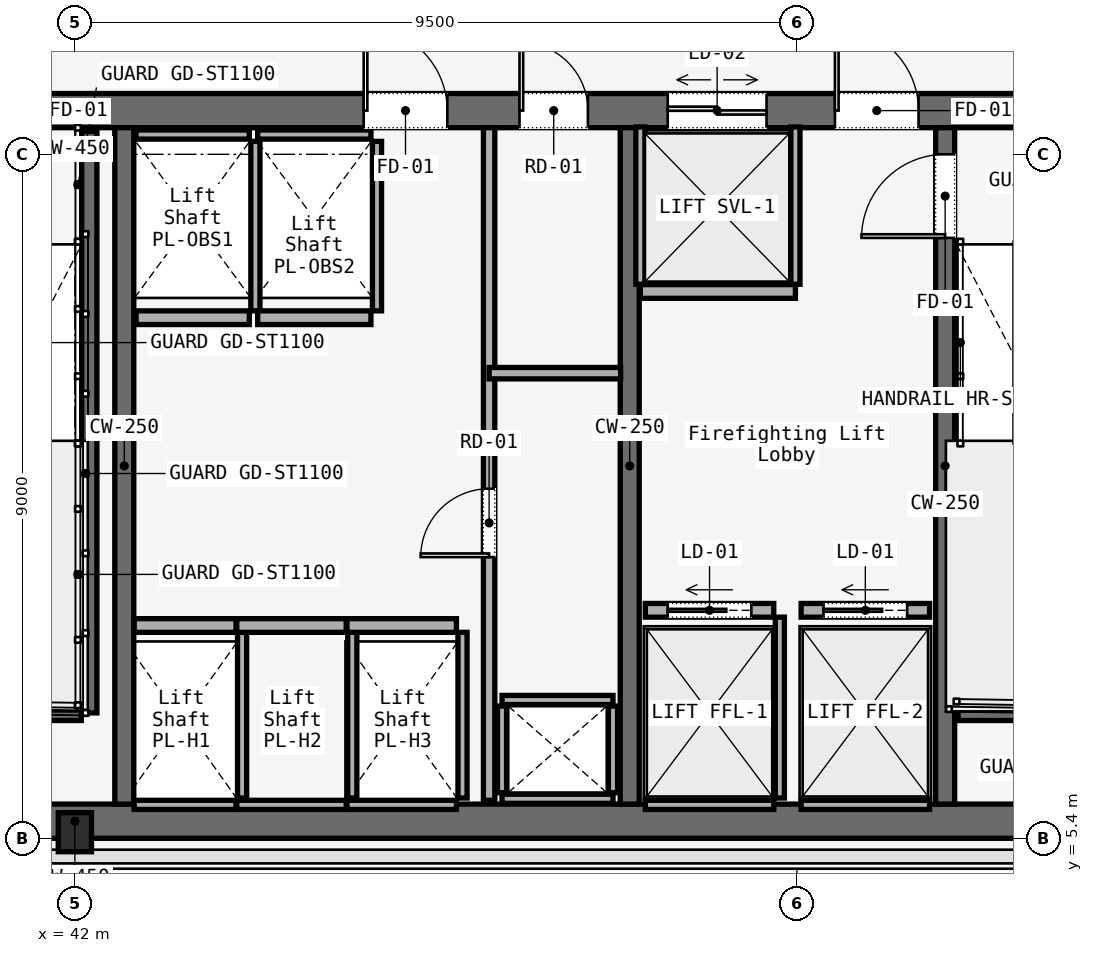
"""IFC4 building model, lengths in metres.
Left out: names, types, materials, properties, quantities, classifications, styles, units other than length and angle.
Written with IfcOpenShell. Run it as: python <this file> out.ifc"""

import sys

from ifc_helpers import new_model, si_unit, direction, frame, frame_2d, origin, origin_2d, place, context, subcontext, project, spatial, rectangle, i_section, extrude, element, fill, save


model = new_model("IFC4")
c1 = context("Model", 3, precision=1e-05, world=origin(), true_north=direction((0.0, 1.0)))
c2 = subcontext(c1, "Body", "Model", "MODEL_VIEW")
j1 = project(units=[si_unit("LENGTHUNIT", "METRE"), si_unit("PLANEANGLEUNIT", "RADIAN")], contexts=[c1])
p1 = place(None, origin())
s1 = spatial("IfcSite", under=j1, at=p1, CompositionType="ELEMENT")
p2 = place(p1, origin())
s2 = spatial("IfcBuilding", under=s1, at=p2, CompositionType="ELEMENT")
p3 = place(p2, frame((0.0, 0.0, 89.2)))
s3 = spatial("IfcBuildingStorey", under=s2, at=p3, CompositionType="ELEMENT", Elevation=89.2)
p4 = place(p3, frame((26.45, 14.975, 0.0), z_axis=(0.0, 0.0, 1.0), x_axis=(1.0, 0.0, 0.0)))
e1 = element("IfcWall", 1, at=p4, inside=s3, PredefinedType="SOLIDWALL", context=c2, shape_type="SweptSolid", body=[
    extrude(rectangle(XDim=31.1, YDim=0.45, at=frame_2d((15.55, 0.0))), origin(), (0.0, 0.0, 1.0), 3.58),
])
p5 = place(p4, frame((1.65, 0.0, 0.0)))
e2 = element("IfcOpeningElement", 2, at=p5, cuts=e1, PredefinedType="OPENING", context=c2, shape_type="SweptSolid", body=[
    extrude(rectangle(XDim=1.1, YDim=2.2, at=frame_2d((0.55, 1.1))), frame((0.0, 0.225, 0.0), z_axis=(0.0, -1.0, 0.0), x_axis=(1.0, 0.0, 0.0)), (0.0, 0.0, 1.0), 0.45),
])
p6 = place(p4, frame((13.65, 0.0, 0.0)))
e3 = element("IfcOpeningElement", 3, at=p6, cuts=e1, PredefinedType="OPENING", context=c2, shape_type="SweptSolid", body=[
    extrude(rectangle(XDim=1.1, YDim=2.2, at=frame_2d((0.55, 1.1))), frame((0.0, 0.225, 0.0), z_axis=(0.0, -1.0, 0.0), x_axis=(1.0, 0.0, 0.0)), (0.0, 0.0, 1.0), 0.45),
])
p7 = place(p4, frame((25.55, 0.0, 0.0)))
e4 = element("IfcOpeningElement", 4, at=p7, cuts=e1, PredefinedType="OPENING", context=c2, shape_type="SweptSolid", body=[
    extrude(rectangle(XDim=1.1, YDim=2.2, at=frame_2d((0.55, 1.1))), frame((0.0, 0.225, 0.0), z_axis=(0.0, -1.0, 0.0), x_axis=(1.0, 0.0, 0.0)), (0.0, 0.0, 1.0), 0.45),
])
p8 = place(p4, frame((10.7, 0.0, 0.0)))
e5 = element("IfcOpeningElement", 5, at=p8, cuts=e1, PredefinedType="OPENING", context=c2, shape_type="SweptSolid", body=[
    extrude(rectangle(XDim=1.4, YDim=2.2, at=frame_2d((0.7, 1.1))), frame((0.0, 0.225, 0.0), z_axis=(0.0, -1.0, 0.0), x_axis=(1.0, 0.0, 0.0)), (0.0, 0.0, 1.0), 0.45),
])
p9 = place(p4, frame((19.35, 0.0, 0.0)))
e6 = element("IfcOpeningElement", 6, at=p9, cuts=e1, PredefinedType="OPENING", context=c2, shape_type="SweptSolid", body=[
    extrude(rectangle(XDim=1.1, YDim=2.2, at=frame_2d((0.55, 1.1))), frame((0.0, 0.225, 0.0), z_axis=(0.0, -1.0, 0.0), x_axis=(1.0, 0.0, 0.0)), (0.0, 0.0, 1.0), 0.45),
])
p10 = place(p4, frame((21.4, 0.0, 0.0)))
e7 = element("IfcOpeningElement", 7, at=p10, cuts=e1, PredefinedType="OPENING", context=c2, shape_type="SweptSolid", body=[
    extrude(rectangle(XDim=0.9, YDim=2.1, at=frame_2d((0.45, 1.05))), frame((0.0, 0.225, 0.0), z_axis=(0.0, -1.0, 0.0), x_axis=(1.0, 0.0, 0.0)), (0.0, 0.0, 1.0), 0.45),
])
p11 = place(p4, frame((23.35, 0.0, 0.0)))
e8 = element("IfcOpeningElement", 8, at=p11, cuts=e1, PredefinedType="OPENING", context=c2, shape_type="SweptSolid", body=[
    extrude(rectangle(XDim=1.3, YDim=2.3, at=frame_2d((0.65, 1.15))), frame((0.0, 0.225, 0.0), z_axis=(0.0, -1.0, 0.0), x_axis=(1.0, 0.0, 0.0)), (0.0, 0.0, 1.0), 0.45),
])
p12 = place(p3, frame((26.45, 5.625, 0.0), z_axis=(0.0, 0.0, 1.0), x_axis=(1.0, 0.0, 0.0)))
e9 = element("IfcWall", 9, at=p12, inside=s3, PredefinedType="SOLIDWALL", context=c2, shape_type="SweptSolid", body=[
    extrude(rectangle(XDim=31.1, YDim=0.45, at=frame_2d((15.55, 0.0))), origin(), (0.0, 0.0, 1.0), 3.58),
])
for number, where, z_axis, x_axis in (
    (10, (42.65, 5.85, 0.0), (0.0, 0.0, 1.0), (0.0, 1.0, 0.0)),
    (11, (49.3, 5.85, 0.0), (0.0, 0.0, 1.0), (0.0, 1.0, 0.0)),
):
    element("IfcWall", number, at=place(p3, frame(where, z_axis=z_axis, x_axis=x_axis)), inside=s3, PredefinedType="SOLIDWALL", context=c2, shape_type="SweptSolid", body=[
        extrude(rectangle(XDim=8.9, YDim=0.25, at=frame_2d((4.45, 0.0))), origin(), (0.0, 0.0, 1.0), 3.58),
    ])
p13 = place(p3, frame((53.45, 5.85, 0.0), z_axis=(0.0, 0.0, 1.0), x_axis=(0.0, 1.0, 0.0)))
e12 = element("IfcWall", 12, at=p13, inside=s3, PredefinedType="SOLIDWALL", context=c2, shape_type="SweptSolid", body=[
    extrude(rectangle(XDim=8.9, YDim=0.25, at=frame_2d((4.45, 0.0))), origin(), (0.0, 0.0, 1.0), 3.58),
])
p14 = place(p13, frame((7.45, 0.0, 0.0)))
e13 = element("IfcOpeningElement", 13, at=p14, cuts=e12, PredefinedType="OPENING", context=c2, shape_type="SweptSolid", body=[
    extrude(rectangle(XDim=1.1, YDim=2.2, at=frame_2d((0.55, 1.1))), frame((0.0, 0.125, 0.0), z_axis=(0.0, -1.0, 0.0), x_axis=(1.0, 0.0, 0.0)), (0.0, 0.0, 1.0), 0.25),
])
p15 = place(p3, frame((42.0, 5.48, 0.0), z_axis=(0.0, 0.0, 1.0), x_axis=(1.0, 0.0, 0.0)))
e14 = element("IfcColumn", 14, at=p15, inside=s3, PredefinedType="COLUMN", context=c2, shape_type="SweptSolid", body=[
    extrude(i_section(OverallWidth=0.437, OverallDepth=0.514, WebThickness=0.061, FlangeThickness=0.077, FilletRadius=0.015, at=origin_2d()), origin(), (0.0, 0.0, 1.0), 3.58),
])
p16 = place(p3, frame((42.19, 14.7, 0.0), z_axis=(0.0, 0.0, 1.0), x_axis=(0.0, -1.0, 0.0)))
e15 = element("IfcWall", 15, at=p16, inside=s3, PredefinedType="SOLIDWALL", context=c2, shape_type="SweptSolid", body=[
    extrude(rectangle(XDim=7.65, YDim=0.2, at=frame_2d((3.825, 0.0))), origin(), (0.0, 0.0, 1.0), 3.8),
])
for number, where, z_axis, x_axis in (
    (16, (38.97, 7.05, 0.0), (0.0, 0.0, 1.0), (1.0, 0.0, 0.0)),
    (17, (53.62, 7.05, 0.0), (0.0, 0.0, 1.0), (1.0, 0.0, 0.0)),
):
    element("IfcWall", number, at=place(p3, frame(where, z_axis=z_axis, x_axis=x_axis)), inside=s3, PredefinedType="SOLIDWALL", context=c2, shape_type="SweptSolid", body=[
        extrude(rectangle(XDim=3.115, YDim=0.2, at=frame_2d((1.558, 0.0))), origin(), (0.0, 0.0, 1.0), 3.8),
    ])
for number, where, z_axis, x_axis in (
    (18, (47.62, 5.92, 0.0), (0.0, 0.0, 1.0), (1.0, 0.0, 0.0)),
    (19, (47.62, 7.22, 0.0), (0.0, 0.0, 1.0), (1.0, 0.0, 0.0)),
):
    element("IfcWall", number, at=place(p3, frame(where, z_axis=z_axis, x_axis=x_axis)), inside=s3, PredefinedType="SOLIDWALL", context=c2, shape_type="SweptSolid", body=[
        extrude(rectangle(XDim=1.46, YDim=0.12, at=frame_2d((0.73, 0.0))), origin(), (0.0, 0.0, 1.0), 2.95),
    ])
for number, where, z_axis, x_axis in (
    (20, (47.62, 6.0, 0.0), (0.0, 0.0, 1.0), (0.0, 1.0, 0.0)),
    (21, (49.08, 6.0, 0.0), (0.0, 0.0, 1.0), (0.0, 1.0, 0.0)),
):
    element("IfcWall", number, at=place(p3, frame(where, z_axis=z_axis, x_axis=x_axis)), inside=s3, PredefinedType="SOLIDWALL", context=c2, shape_type="SweptSolid", body=[
        extrude(rectangle(XDim=1.14, YDim=0.12, at=frame_2d((0.57, 0.0))), origin(), (0.0, 0.0, 1.0), 2.95),
    ])
p17 = place(p3, frame((47.45, 5.9, 0.0), z_axis=(0.0, 0.0, 1.0), x_axis=(0.0, 1.0, 0.0)))
e22 = element("IfcWall", 22, at=p17, inside=s3, PredefinedType="PARTITIONING", context=c2, shape_type="SweptSolid", body=[
    extrude(rectangle(XDim=8.85, YDim=0.15, at=frame_2d((4.425, 0.0))), origin(), (0.0, 0.0, 1.0), 2.95),
])
p18 = place(p17, frame((3.2, 0.0, 0.0)))
e23 = element("IfcOpeningElement", 23, at=p18, cuts=e22, PredefinedType="OPENING", context=c2, shape_type="SweptSolid", body=[
    extrude(rectangle(XDim=0.9, YDim=2.1, at=frame_2d((0.45, 1.05))), frame((0.0, 0.075, 0.0), z_axis=(0.0, -1.0, 0.0), x_axis=(1.0, 0.0, 0.0)), (0.0, 0.0, 1.0), 0.15),
])
p19 = place(p3, frame((47.45, 11.52, 0.0), z_axis=(0.0, 0.0, 1.0), x_axis=(1.0, 0.0, 0.0)))
e24 = element("IfcWall", 24, at=p19, inside=s3, PredefinedType="PARTITIONING", context=c2, shape_type="SweptSolid", body=[
    extrude(rectangle(XDim=1.73, YDim=0.15, at=frame_2d((0.865, 0.0))), origin(), (0.0, 0.0, 1.0), 2.95),
])
p20 = place(p3, frame((42.78, 8.2, 0.0), z_axis=(0.0, 0.0, 1.0), x_axis=(1.0, 0.0, 0.0)))
e25 = element("IfcWall", 25, at=p20, inside=s3, PredefinedType="SOLIDWALL", context=c2, shape_type="SweptSolid", body=[
    extrude(rectangle(XDim=1.34, YDim=0.18, at=frame_2d((0.67, 0.0))), origin(), (0.0, 0.0, 1.0), 2.95),
])
p21 = place(p3, frame((42.78, 5.84, 0.0), z_axis=(0.0, 0.0, 1.0), x_axis=(1.0, 0.0, 0.0)))
e26 = element("IfcWall", 26, at=p21, inside=s3, PredefinedType="SOLIDWALL", context=c2, shape_type="SweptSolid", body=[
    extrude(rectangle(XDim=1.34, YDim=0.12, at=frame_2d((0.67, 0.0))), origin(), (0.0, 0.0, 1.0), 2.95),
])
p22 = place(p3, frame((44.2, 5.93, 0.0), z_axis=(0.0, 0.0, 1.0), x_axis=(0.0, 1.0, 0.0)))
e27 = element("IfcWall", 27, at=p22, inside=s3, PredefinedType="SOLIDWALL", context=c2, shape_type="SweptSolid", body=[
    extrude(rectangle(XDim=2.18, YDim=0.12, at=frame_2d((1.09, 0.0))), origin(), (0.0, 0.0, 1.0), 2.95),
])
p23 = place(p3, frame((44.13, 8.2, 0.0), z_axis=(0.0, 0.0, 1.0), x_axis=(1.0, 0.0, 0.0)))
e28 = element("IfcWall", 28, at=p23, inside=s3, PredefinedType="SOLIDWALL", context=c2, shape_type="SweptSolid", body=[
    extrude(rectangle(XDim=1.44, YDim=0.18, at=frame_2d((0.72, 0.0))), origin(), (0.0, 0.0, 1.0), 2.95),
])
p24 = place(p3, frame((44.13, 5.84, 0.0), z_axis=(0.0, 0.0, 1.0), x_axis=(1.0, 0.0, 0.0)))
e29 = element("IfcWall", 29, at=p24, inside=s3, PredefinedType="SOLIDWALL", context=c2, shape_type="SweptSolid", body=[
    extrude(rectangle(XDim=1.44, YDim=0.12, at=frame_2d((0.72, 0.0))), origin(), (0.0, 0.0, 1.0), 2.95),
])
p25 = place(p3, frame((45.65, 5.93, 0.0), z_axis=(0.0, 0.0, 1.0), x_axis=(0.0, 1.0, 0.0)))
e30 = element("IfcWall", 30, at=p25, inside=s3, PredefinedType="SOLIDWALL", context=c2, shape_type="SweptSolid", body=[
    extrude(rectangle(XDim=2.18, YDim=0.12, at=frame_2d((1.09, 0.0))), origin(), (0.0, 0.0, 1.0), 2.95),
])
p26 = place(p3, frame((45.58, 8.2, 0.0), z_axis=(0.0, 0.0, 1.0), x_axis=(1.0, 0.0, 0.0)))
e31 = element("IfcWall", 31, at=p26, inside=s3, PredefinedType="SOLIDWALL", context=c2, shape_type="SweptSolid", body=[
    extrude(rectangle(XDim=1.44, YDim=0.18, at=frame_2d((0.72, 0.0))), origin(), (0.0, 0.0, 1.0), 2.95),
])
p27 = place(p3, frame((45.58, 5.84, 0.0), z_axis=(0.0, 0.0, 1.0), x_axis=(1.0, 0.0, 0.0)))
e32 = element("IfcWall", 32, at=p27, inside=s3, PredefinedType="SOLIDWALL", context=c2, shape_type="SweptSolid", body=[
    extrude(rectangle(XDim=1.44, YDim=0.12, at=frame_2d((0.72, 0.0))), origin(), (0.0, 0.0, 1.0), 2.95),
])
p28 = place(p3, frame((47.1, 5.93, 0.0), z_axis=(0.0, 0.0, 1.0), x_axis=(0.0, 1.0, 0.0)))
e33 = element("IfcWall", 33, at=p28, inside=s3, PredefinedType="SOLIDWALL", context=c2, shape_type="SweptSolid", body=[
    extrude(rectangle(XDim=2.18, YDim=0.12, at=frame_2d((1.09, 0.0))), origin(), (0.0, 0.0, 1.0), 2.95),
])
p29 = place(p3, frame((42.805, 12.25, 0.0), z_axis=(0.0, 0.0, 1.0), x_axis=(1.0, 0.0, 0.0)))
e34 = element("IfcWall", 34, at=p29, inside=s3, PredefinedType="SOLIDWALL", context=c2, shape_type="SweptSolid", body=[
    extrude(rectangle(XDim=1.49, YDim=0.18, at=frame_2d((0.745, 0.0))), origin(), (0.0, 0.0, 1.0), 2.95),
])
p30 = place(p3, frame((42.805, 14.66, 0.0), z_axis=(0.0, 0.0, 1.0), x_axis=(1.0, 0.0, 0.0)))
e35 = element("IfcWall", 35, at=p30, inside=s3, PredefinedType="SOLIDWALL", context=c2, shape_type="SweptSolid", body=[
    extrude(rectangle(XDim=1.49, YDim=0.12, at=frame_2d((0.745, 0.0))), origin(), (0.0, 0.0, 1.0), 2.95),
])
p31 = place(p3, frame((44.375, 12.34, 0.0), z_axis=(0.0, 0.0, 1.0), x_axis=(0.0, 1.0, 0.0)))
e36 = element("IfcWall", 36, at=p31, inside=s3, PredefinedType="SOLIDWALL", context=c2, shape_type="SweptSolid", body=[
    extrude(rectangle(XDim=2.23, YDim=0.12, at=frame_2d((1.115, 0.0))), origin(), (0.0, 0.0, 1.0), 2.95),
])
p32 = place(p3, frame((44.405, 12.25, 0.0), z_axis=(0.0, 0.0, 1.0), x_axis=(1.0, 0.0, 0.0)))
e37 = element("IfcWall", 37, at=p32, inside=s3, PredefinedType="SOLIDWALL", context=c2, shape_type="SweptSolid", body=[
    extrude(rectangle(XDim=1.49, YDim=0.18, at=frame_2d((0.745, 0.0))), origin(), (0.0, 0.0, 1.0), 2.95),
])
p33 = place(p3, frame((44.405, 14.66, 0.0), z_axis=(0.0, 0.0, 1.0), x_axis=(1.0, 0.0, 0.0)))
e38 = element("IfcWall", 38, at=p33, inside=s3, PredefinedType="SOLIDWALL", context=c2, shape_type="SweptSolid", body=[
    extrude(rectangle(XDim=1.49, YDim=0.12, at=frame_2d((0.745, 0.0))), origin(), (0.0, 0.0, 1.0), 2.95),
])
p34 = place(p3, frame((45.975, 12.34, 0.0), z_axis=(0.0, 0.0, 1.0), x_axis=(0.0, 1.0, 0.0)))
e39 = element("IfcWall", 39, at=p34, inside=s3, PredefinedType="SOLIDWALL", context=c2, shape_type="SweptSolid", body=[
    extrude(rectangle(XDim=2.23, YDim=0.12, at=frame_2d((1.115, 0.0))), origin(), (0.0, 0.0, 1.0), 2.95),
])
p35 = place(p3, frame((49.505, 8.4, 0.0), z_axis=(0.0, 0.0, 1.0), x_axis=(1.0, 0.0, 0.0)))
e40 = element("IfcWall", 40, at=p35, inside=s3, PredefinedType="SOLIDWALL", context=c2, shape_type="SweptSolid", body=[
    extrude(rectangle(XDim=1.69, YDim=0.18, at=frame_2d((0.845, 0.0))), origin(), (0.0, 0.0, 1.0), 2.95),
])
p36 = place(p35, frame((0.295, 0.0, 0.0)))
e41 = element("IfcOpeningElement", 41, at=p36, cuts=e40, PredefinedType="OPENING", context=c2, shape_type="SweptSolid", body=[
    extrude(rectangle(XDim=1.1, YDim=2.2, at=frame_2d((0.55, 1.1))), frame((0.0, 0.09, 0.0), z_axis=(0.0, -1.0, 0.0), x_axis=(1.0, 0.0, 0.0)), (0.0, 0.0, 1.0), 0.18),
])
p37 = place(p3, frame((49.505, 5.84, 0.0), z_axis=(0.0, 0.0, 1.0), x_axis=(1.0, 0.0, 0.0)))
e42 = element("IfcWall", 42, at=p37, inside=s3, PredefinedType="SOLIDWALL", context=c2, shape_type="SweptSolid", body=[
    extrude(rectangle(XDim=1.69, YDim=0.12, at=frame_2d((0.845, 0.0))), origin(), (0.0, 0.0, 1.0), 2.95),
])
p38 = place(p3, frame((51.275, 5.93, 0.0), z_axis=(0.0, 0.0, 1.0), x_axis=(0.0, 1.0, 0.0)))
e43 = element("IfcWall", 43, at=p38, inside=s3, PredefinedType="SOLIDWALL", context=c2, shape_type="SweptSolid", body=[
    extrude(rectangle(XDim=2.38, YDim=0.12, at=frame_2d((1.19, 0.0))), origin(), (0.0, 0.0, 1.0), 2.95),
])
p39 = place(p3, frame((51.555, 8.4, 0.0), z_axis=(0.0, 0.0, 1.0), x_axis=(1.0, 0.0, 0.0)))
e44 = element("IfcWall", 44, at=p39, inside=s3, PredefinedType="SOLIDWALL", context=c2, shape_type="SweptSolid", body=[
    extrude(rectangle(XDim=1.69, YDim=0.18, at=frame_2d((0.845, 0.0))), origin(), (0.0, 0.0, 1.0), 2.95),
])
p40 = place(p39, frame((0.295, 0.0, 0.0)))
e45 = element("IfcOpeningElement", 45, at=p40, cuts=e44, PredefinedType="OPENING", context=c2, shape_type="SweptSolid", body=[
    extrude(rectangle(XDim=1.1, YDim=2.2, at=frame_2d((0.55, 1.1))), frame((0.0, 0.09, 0.0), z_axis=(0.0, -1.0, 0.0), x_axis=(1.0, 0.0, 0.0)), (0.0, 0.0, 1.0), 0.18),
])
p41 = place(p3, frame((51.555, 5.84, 0.0), z_axis=(0.0, 0.0, 1.0), x_axis=(1.0, 0.0, 0.0)))
e46 = element("IfcWall", 46, at=p41, inside=s3, PredefinedType="SOLIDWALL", context=c2, shape_type="SweptSolid", body=[
    extrude(rectangle(XDim=1.69, YDim=0.12, at=frame_2d((0.845, 0.0))), origin(), (0.0, 0.0, 1.0), 2.95),
])
p42 = place(p3, frame((49.44, 12.595, 0.0), z_axis=(0.0, 0.0, 1.0), x_axis=(1.0, 0.0, 0.0)))
e47 = element("IfcWall", 47, at=p42, inside=s3, PredefinedType="SOLIDWALL", context=c2, shape_type="SweptSolid", body=[
    extrude(rectangle(XDim=2.04, YDim=0.18, at=frame_2d((1.02, 0.0))), origin(), (0.0, 0.0, 1.0), 2.95),
])
for number, where, z_axis, x_axis in (
    (48, (49.44, 12.69, 0.0), (0.0, 0.0, 1.0), (0.0, 1.0, 0.0)),
    (49, (51.48, 12.69, 0.0), (0.0, 0.0, 1.0), (0.0, 1.0, 0.0)),
):
    element("IfcWall", number, at=place(p3, frame(where, z_axis=z_axis, x_axis=x_axis)), inside=s3, PredefinedType="SOLIDWALL", context=c2, shape_type="SweptSolid", body=[
        extrude(rectangle(XDim=2.07, YDim=0.12, at=frame_2d((1.035, 0.0))), origin(), (0.0, 0.0, 1.0), 2.95),
    ])
p43 = place(p7, origin())
e50 = element("IfcDoor", 50, at=p43, inside=s3, OperationType="SINGLE_SWING_RIGHT", PredefinedType="DOOR", context=c2, shape_type="SweptSolid", body=[
    extrude(rectangle(XDim=1.1, YDim=2.2, at=frame_2d((0.55, 1.1))), frame((0.0, 0.025, 0.0), z_axis=(0.0, -1.0, 0.0), x_axis=(1.0, 0.0, 0.0)), (0.0, 0.0, 1.0), 0.05),
])
fill(e4, e50)
p44 = place(p9, origin())
e51 = element("IfcDoor", 51, at=p44, inside=s3, OperationType="SINGLE_SWING_LEFT", PredefinedType="DOOR", context=c2, shape_type="SweptSolid", body=[
    extrude(rectangle(XDim=1.1, YDim=2.2, at=frame_2d((0.55, 1.1))), frame((0.0, 0.025, 0.0), z_axis=(0.0, -1.0, 0.0), x_axis=(1.0, 0.0, 0.0)), (0.0, 0.0, 1.0), 0.05),
])
fill(e6, e51)
p45 = place(p10, origin())
e52 = element("IfcDoor", 52, at=p45, inside=s3, OperationType="SINGLE_SWING_LEFT", PredefinedType="DOOR", context=c2, shape_type="SweptSolid", body=[
    extrude(rectangle(XDim=0.9, YDim=2.1, at=frame_2d((0.45, 1.05))), frame((0.0, 0.025, 0.0), z_axis=(0.0, -1.0, 0.0), x_axis=(1.0, 0.0, 0.0)), (0.0, 0.0, 1.0), 0.05),
])
fill(e7, e52)
p46 = place(p14, origin())
e53 = element("IfcDoor", 53, at=p46, inside=s3, OperationType="SINGLE_SWING_LEFT", PredefinedType="DOOR", context=c2, shape_type="SweptSolid", body=[
    extrude(rectangle(XDim=1.1, YDim=2.2, at=frame_2d((0.55, 1.1))), frame((0.0, 0.025, 0.0), z_axis=(0.0, -1.0, 0.0), x_axis=(1.0, 0.0, 0.0)), (0.0, 0.0, 1.0), 0.05),
])
fill(e13, e53)
p47 = place(p18, origin())
e54 = element("IfcDoor", 54, at=p47, inside=s3, OperationType="SINGLE_SWING_LEFT", PredefinedType="DOOR", context=c2, shape_type="SweptSolid", body=[
    extrude(rectangle(XDim=0.9, YDim=2.1, at=frame_2d((0.45, 1.05))), frame((0.0, 0.025, 0.0), z_axis=(0.0, -1.0, 0.0), x_axis=(1.0, 0.0, 0.0)), (0.0, 0.0, 1.0), 0.05),
])
fill(e23, e54)
p48 = place(p36, origin())
e55 = element("IfcDoor", 55, at=p48, inside=s3, OperationType="SLIDING_TO_LEFT", PredefinedType="DOOR", context=c2, shape_type="SweptSolid", body=[
    extrude(rectangle(XDim=1.1, YDim=2.2, at=frame_2d((0.55, 1.1))), frame((0.0, 0.025, 0.0), z_axis=(0.0, -1.0, 0.0), x_axis=(1.0, 0.0, 0.0)), (0.0, 0.0, 1.0), 0.05),
])
fill(e41, e55)
p49 = place(p40, origin())
e56 = element("IfcDoor", 56, at=p49, inside=s3, OperationType="SLIDING_TO_LEFT", PredefinedType="DOOR", context=c2, shape_type="SweptSolid", body=[
    extrude(rectangle(XDim=1.1, YDim=2.2, at=frame_2d((0.55, 1.1))), frame((0.0, 0.025, 0.0), z_axis=(0.0, -1.0, 0.0), x_axis=(1.0, 0.0, 0.0)), (0.0, 0.0, 1.0), 0.05),
])
fill(e45, e56)
p50 = place(p11, origin())
e57 = element("IfcDoor", 57, at=p50, inside=s3, OperationType="DOUBLE_DOOR_SLIDING", PredefinedType="DOOR", context=c2, shape_type="SweptSolid", body=[
    extrude(rectangle(XDim=1.3, YDim=2.3, at=frame_2d((0.65, 1.15))), frame((0.0, 0.025, 0.0), z_axis=(0.0, -1.0, 0.0), x_axis=(1.0, 0.0, 0.0)), (0.0, 0.0, 1.0), 0.05),
])
fill(e8, e57)
save(model, sys.argv[1])
